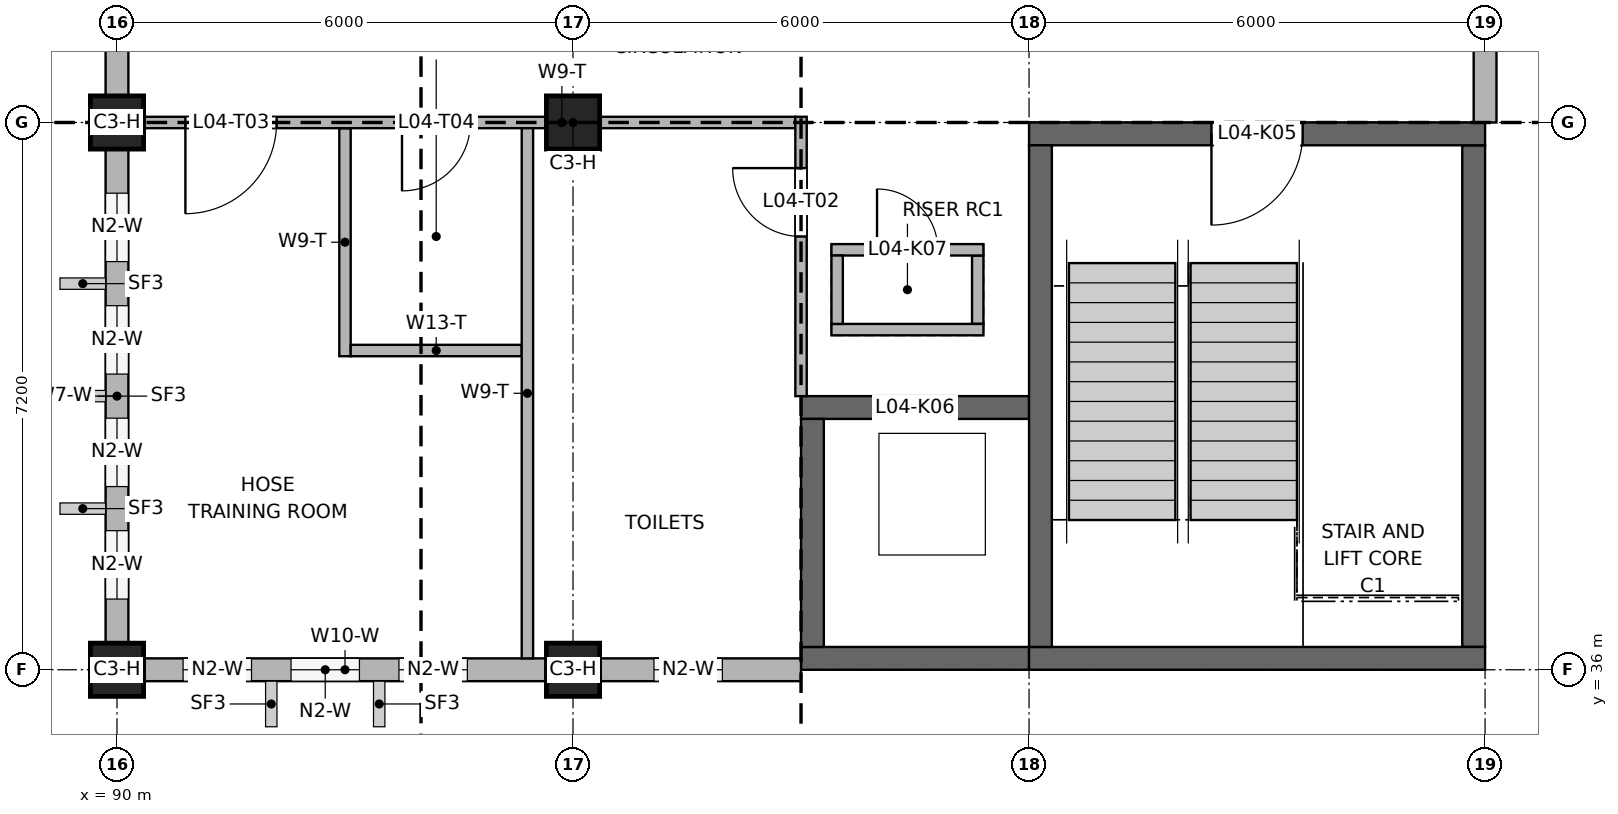
"""IFC4 building model, lengths in metres.
Left out: names, types, materials, properties, quantities, classifications, styles, units other than length and angle.
Written with IfcOpenShell. Run it as: python <this file> out.ifc"""

import sys

from ifc_helpers import new_model, si_unit, direction, frame, frame_2d, origin, origin_2d, place, context, subcontext, project, spatial, rectangle, extrude, element, fill, save


model = new_model("IFC4")
c1 = context("Model", 3, precision=1e-05, world=origin(), true_north=direction((0.0, 1.0)))
c2 = subcontext(c1, "Body", "Model", "MODEL_VIEW")
j1 = project(units=[si_unit("LENGTHUNIT", "METRE"), si_unit("PLANEANGLEUNIT", "RADIAN")], contexts=[c1])
p1 = place(None, origin())
s1 = spatial("IfcSite", under=j1, at=p1, CompositionType="ELEMENT")
p2 = place(p1, origin())
s2 = spatial("IfcBuilding", under=s1, at=p2, CompositionType="ELEMENT")
p3 = place(p2, frame((0.0, 0.0, 16.8)))
s3 = spatial("IfcBuildingStorey", under=s2, at=p3, CompositionType="ELEMENT", Elevation=16.8)
p4 = place(p3, frame((102.0, 36.15, 0.0), z_axis=(0.0, 0.0, 1.0), x_axis=(1.0, 0.0, 0.0)))
e1 = element("IfcWall", 1, at=p4, inside=s3, PredefinedType="SHEAR", context=c2, shape_type="SweptSolid", body=[
    extrude(rectangle(XDim=6.0, YDim=0.3, at=frame_2d((3.0, 0.0))), origin(), (0.0, 0.0, 1.0), 4.0),
])
p5 = place(p3, frame((102.0, 43.05, 0.0), z_axis=(0.0, 0.0, 1.0), x_axis=(1.0, 0.0, 0.0)))
e2 = element("IfcWall", 2, at=p5, inside=s3, PredefinedType="SHEAR", context=c2, shape_type="SweptSolid", body=[
    extrude(rectangle(XDim=6.0, YDim=0.3, at=frame_2d((3.0, 0.0))), origin(), (0.0, 0.0, 1.0), 4.0),
])
p6 = place(p5, frame((2.4, 0.0, 0.0)))
e3 = element("IfcOpeningElement", 3, at=p6, cuts=e2, PredefinedType="OPENING", context=c2, shape_type="SweptSolid", body=[
    extrude(rectangle(XDim=1.2, YDim=2.1, at=frame_2d((0.6, 1.05))), frame((0.0, 0.16, 0.0), z_axis=(0.0, -1.0, 0.0), x_axis=(1.0, 0.0, 0.0)), (0.0, 0.0, 1.0), 0.32),
])
for number, where, z_axis, x_axis in (
    (4, (102.15, 36.3, 0.0), (0.0, 0.0, 1.0), (0.0, 1.0, 0.0)),
    (5, (107.85, 36.3, 0.0), (0.0, 0.0, 1.0), (0.0, 1.0, 0.0)),
):
    element("IfcWall", number, at=place(p3, frame(where, z_axis=z_axis, x_axis=x_axis)), inside=s3, PredefinedType="SHEAR", context=c2, shape_type="SweptSolid", body=[
        extrude(rectangle(XDim=6.6, YDim=0.3, at=frame_2d((3.3, 0.0))), origin(), (0.0, 0.0, 1.0), 4.0),
    ])
p7 = place(p3, frame((99.0, 36.15, 0.0), z_axis=(0.0, 0.0, 1.0), x_axis=(1.0, 0.0, 0.0)))
e6 = element("IfcWall", 6, at=p7, inside=s3, PredefinedType="SHEAR", context=c2, shape_type="SweptSolid", body=[
    extrude(rectangle(XDim=3.0, YDim=0.3, at=frame_2d((1.5, 0.0))), origin(), (0.0, 0.0, 1.0), 4.2),
])
p8 = place(p3, frame((99.0, 39.45, 0.0), z_axis=(0.0, 0.0, 1.0), x_axis=(1.0, 0.0, 0.0)))
e7 = element("IfcWall", 7, at=p8, inside=s3, PredefinedType="SHEAR", context=c2, shape_type="SweptSolid", body=[
    extrude(rectangle(XDim=3.0, YDim=0.3, at=frame_2d((1.5, 0.0))), origin(), (0.0, 0.0, 1.0), 4.2),
])
p9 = place(p8, frame((0.95, 0.0, 0.0)))
e8 = element("IfcOpeningElement", 8, at=p9, cuts=e7, PredefinedType="OPENING", context=c2, shape_type="SweptSolid", body=[
    extrude(rectangle(XDim=1.1, YDim=2.1, at=frame_2d((0.55, 1.05))), frame((0.0, 0.16, 0.0), z_axis=(0.0, -1.0, 0.0), x_axis=(1.0, 0.0, 0.0)), (0.0, 0.0, 1.0), 0.32),
])
p10 = place(p3, frame((99.15, 36.3, 0.0), z_axis=(0.0, 0.0, 1.0), x_axis=(0.0, 1.0, 0.0)))
e9 = element("IfcWall", 9, at=p10, inside=s3, PredefinedType="SHEAR", context=c2, shape_type="SweptSolid", body=[
    extrude(rectangle(XDim=3.0, YDim=0.3, at=frame_2d((1.5, 0.0))), origin(), (0.0, 0.0, 1.0), 4.2),
])
p11 = place(p3, frame((99.4, 40.475, 0.0), z_axis=(0.0, 0.0, 1.0), x_axis=(1.0, 0.0, 0.0)))
e10 = element("IfcWall", 10, at=p11, inside=s3, PredefinedType="SOLIDWALL", context=c2, shape_type="SweptSolid", body=[
    extrude(rectangle(XDim=2.0, YDim=0.15, at=frame_2d((1.0, 0.0))), origin(), (0.0, 0.0, 1.0), 4.2),
])
p12 = place(p3, frame((99.4, 41.525, 0.0), z_axis=(0.0, 0.0, 1.0), x_axis=(1.0, 0.0, 0.0)))
e11 = element("IfcWall", 11, at=p12, inside=s3, PredefinedType="SOLIDWALL", context=c2, shape_type="SweptSolid", body=[
    extrude(rectangle(XDim=2.0, YDim=0.15, at=frame_2d((1.0, 0.0))), origin(), (0.0, 0.0, 1.0), 4.2),
])
p13 = place(p12, frame((0.6, 0.0, 0.0)))
e12 = element("IfcOpeningElement", 12, at=p13, cuts=e11, PredefinedType="OPENING", context=c2, shape_type="SweptSolid", body=[
    extrude(rectangle(XDim=0.8, YDim=2.1, at=frame_2d((0.4, 1.05))), frame((0.0, 0.085, 0.0), z_axis=(0.0, -1.0, 0.0), x_axis=(1.0, 0.0, 0.0)), (0.0, 0.0, 1.0), 0.17),
])
for number, where, z_axis, x_axis in (
    (13, (99.475, 40.55, 0.0), (0.0, 0.0, 1.0), (0.0, 1.0, 0.0)),
    (14, (101.325, 40.55, 0.0), (0.0, 0.0, 1.0), (0.0, 1.0, 0.0)),
):
    element("IfcWall", number, at=place(p3, frame(where, z_axis=z_axis, x_axis=x_axis)), inside=s3, PredefinedType="SOLIDWALL", context=c2, shape_type="SweptSolid", body=[
        extrude(rectangle(XDim=0.9, YDim=0.15, at=frame_2d((0.45, 0.0))), origin(), (0.0, 0.0, 1.0), 4.2),
    ])
for number, where, z_axis, x_axis in (
    (15, (90.0, 36.0, 0.0), (0.0, 0.0, 1.0), (1.0, 0.0, 0.0)),
    (16, (96.0, 36.0, 0.0), (0.0, 0.0, 1.0), (1.0, 0.0, 0.0)),
    (17, (90.0, 43.2, 0.0), (0.0, 0.0, 1.0), (1.0, 0.0, 0.0)),
    (18, (96.0, 43.2, 0.0), (0.0, 0.0, 1.0), (1.0, 0.0, 0.0)),
):
    element("IfcColumn", number, at=place(p3, frame(where, z_axis=z_axis, x_axis=x_axis)), inside=s3, PredefinedType="COLUMN", context=c2, shape_type="SweptSolid", body=[
        extrude(rectangle(XDim=0.7, YDim=0.7, at=origin_2d()), origin(), (0.0, 0.0, 1.0), 4.0),
    ])
p14 = place(p3, frame((90.0, 36.35, 0.0), z_axis=(0.0, 0.0, 1.0), x_axis=(0.0, 1.0, 0.0)))
e19 = element("IfcWall", 19, at=p14, inside=s3, PredefinedType="SOLIDWALL", context=c2, shape_type="SweptSolid", body=[
    extrude(rectangle(XDim=6.5, YDim=0.3, at=frame_2d((3.25, 0.0))), origin(), (0.0, 0.0, 1.0), 3.2),
])
p15 = place(p14, frame((0.58, 0.0, 0.9)))
e20 = element("IfcOpeningElement", 20, at=p15, cuts=e19, PredefinedType="OPENING", context=c2, shape_type="SweptSolid", body=[
    extrude(rectangle(XDim=0.9, YDim=1.2, at=frame_2d((0.45, 0.6))), frame((0.0, 0.16, 0.0), z_axis=(0.0, -1.0, 0.0), x_axis=(1.0, 0.0, 0.0)), (0.0, 0.0, 1.0), 0.32),
])
p16 = place(p14, frame((2.06, 0.0, 0.9)))
e21 = element("IfcOpeningElement", 21, at=p16, cuts=e19, PredefinedType="OPENING", context=c2, shape_type="SweptSolid", body=[
    extrude(rectangle(XDim=0.9, YDim=1.2, at=frame_2d((0.45, 0.6))), frame((0.0, 0.16, 0.0), z_axis=(0.0, -1.0, 0.0), x_axis=(1.0, 0.0, 0.0)), (0.0, 0.0, 1.0), 0.32),
])
p17 = place(p14, frame((3.54, 0.0, 0.9)))
e22 = element("IfcOpeningElement", 22, at=p17, cuts=e19, PredefinedType="OPENING", context=c2, shape_type="SweptSolid", body=[
    extrude(rectangle(XDim=0.9, YDim=1.2, at=frame_2d((0.45, 0.6))), frame((0.0, 0.16, 0.0), z_axis=(0.0, -1.0, 0.0), x_axis=(1.0, 0.0, 0.0)), (0.0, 0.0, 1.0), 0.32),
])
p18 = place(p14, frame((5.02, 0.0, 0.9)))
e23 = element("IfcOpeningElement", 23, at=p18, cuts=e19, PredefinedType="OPENING", context=c2, shape_type="SweptSolid", body=[
    extrude(rectangle(XDim=0.9, YDim=1.2, at=frame_2d((0.45, 0.6))), frame((0.0, 0.16, 0.0), z_axis=(0.0, -1.0, 0.0), x_axis=(1.0, 0.0, 0.0)), (0.0, 0.0, 1.0), 0.32),
])
p19 = place(p3, frame((90.0, 43.55, 0.0), z_axis=(0.0, 0.0, 1.0), x_axis=(0.0, 1.0, 0.0)))
e24 = element("IfcWall", 24, at=p19, inside=s3, PredefinedType="SOLIDWALL", context=c2, shape_type="SweptSolid", body=[
    extrude(rectangle(XDim=6.85, YDim=0.3, at=frame_2d((3.425, 0.0))), origin(), (0.0, 0.0, 1.0), 3.1),
])
p20 = place(p19, frame((2.275, 0.0, 0.9)))
e25 = element("IfcOpeningElement", 25, at=p20, cuts=e24, PredefinedType="OPENING", context=c2, shape_type="SweptSolid", body=[
    extrude(rectangle(XDim=0.9, YDim=1.2, at=frame_2d((0.45, 0.6))), frame((0.0, 0.16, 0.0), z_axis=(0.0, -1.0, 0.0), x_axis=(1.0, 0.0, 0.0)), (0.0, 0.0, 1.0), 0.32),
])
p21 = place(p19, frame((3.8, 0.0, 0.9)))
e26 = element("IfcOpeningElement", 26, at=p21, cuts=e24, PredefinedType="OPENING", context=c2, shape_type="SweptSolid", body=[
    extrude(rectangle(XDim=0.9, YDim=1.2, at=frame_2d((0.45, 0.6))), frame((0.0, 0.16, 0.0), z_axis=(0.0, -1.0, 0.0), x_axis=(1.0, 0.0, 0.0)), (0.0, 0.0, 1.0), 0.32),
])
p22 = place(p19, frame((5.325, 0.0, 0.9)))
e27 = element("IfcOpeningElement", 27, at=p22, cuts=e24, PredefinedType="OPENING", context=c2, shape_type="SweptSolid", body=[
    extrude(rectangle(XDim=0.9, YDim=1.2, at=frame_2d((0.45, 0.6))), frame((0.0, 0.16, 0.0), z_axis=(0.0, -1.0, 0.0), x_axis=(1.0, 0.0, 0.0)), (0.0, 0.0, 1.0), 0.32),
])
p23 = place(p3, frame((108.0, 43.2, 0.0), z_axis=(0.0, 0.0, 1.0), x_axis=(0.0, 1.0, 0.0)))
e28 = element("IfcWall", 28, at=p23, inside=s3, PredefinedType="SOLIDWALL", context=c2, shape_type="SweptSolid", body=[
    extrude(rectangle(XDim=6.85, YDim=0.3, at=frame_2d((3.425, 0.0))), origin(), (0.0, 0.0, 1.0), 3.1),
])
p24 = place(p23, frame((2.597, 0.0, 0.9)))
e29 = element("IfcOpeningElement", 29, at=p24, cuts=e28, PredefinedType="OPENING", context=c2, shape_type="SweptSolid", body=[
    extrude(rectangle(XDim=0.9, YDim=1.2, at=frame_2d((0.45, 0.6))), frame((0.0, 0.16, 0.0), z_axis=(0.0, -1.0, 0.0), x_axis=(1.0, 0.0, 0.0)), (0.0, 0.0, 1.0), 0.32),
])
p25 = place(p23, frame((4.015, 0.0, 0.9)))
e30 = element("IfcOpeningElement", 30, at=p25, cuts=e28, PredefinedType="OPENING", context=c2, shape_type="SweptSolid", body=[
    extrude(rectangle(XDim=0.9, YDim=1.2, at=frame_2d((0.45, 0.6))), frame((0.0, 0.16, 0.0), z_axis=(0.0, -1.0, 0.0), x_axis=(1.0, 0.0, 0.0)), (0.0, 0.0, 1.0), 0.32),
])
p26 = place(p23, frame((5.433, 0.0, 0.9)))
e31 = element("IfcOpeningElement", 31, at=p26, cuts=e28, PredefinedType="OPENING", context=c2, shape_type="SweptSolid", body=[
    extrude(rectangle(XDim=0.9, YDim=1.2, at=frame_2d((0.45, 0.6))), frame((0.0, 0.16, 0.0), z_axis=(0.0, -1.0, 0.0), x_axis=(1.0, 0.0, 0.0)), (0.0, 0.0, 1.0), 0.32),
])
p27 = place(p3, frame((90.35, 36.0, 0.0), z_axis=(0.0, 0.0, 1.0), x_axis=(1.0, 0.0, 0.0)))
e32 = element("IfcWall", 32, at=p27, inside=s3, PredefinedType="SOLIDWALL", context=c2, shape_type="SweptSolid", body=[
    extrude(rectangle(XDim=5.3, YDim=0.3, at=frame_2d((2.65, 0.0))), origin(), (0.0, 0.0, 1.0), 3.3),
])
p28 = place(p27, frame((0.52, 0.0, 0.9)))
e33 = element("IfcOpeningElement", 33, at=p28, cuts=e32, PredefinedType="OPENING", context=c2, shape_type="SweptSolid", body=[
    extrude(rectangle(XDim=0.9, YDim=1.2, at=frame_2d((0.45, 0.6))), frame((0.0, 0.16, 0.0), z_axis=(0.0, -1.0, 0.0), x_axis=(1.0, 0.0, 0.0)), (0.0, 0.0, 1.0), 0.32),
])
p29 = place(p27, frame((1.94, 0.0, 0.9)))
e34 = element("IfcOpeningElement", 34, at=p29, cuts=e32, PredefinedType="OPENING", context=c2, shape_type="SweptSolid", body=[
    extrude(rectangle(XDim=0.9, YDim=1.2, at=frame_2d((0.45, 0.6))), frame((0.0, 0.16, 0.0), z_axis=(0.0, -1.0, 0.0), x_axis=(1.0, 0.0, 0.0)), (0.0, 0.0, 1.0), 0.32),
])
p30 = place(p27, frame((3.36, 0.0, 0.9)))
e35 = element("IfcOpeningElement", 35, at=p30, cuts=e32, PredefinedType="OPENING", context=c2, shape_type="SweptSolid", body=[
    extrude(rectangle(XDim=0.9, YDim=1.2, at=frame_2d((0.45, 0.6))), frame((0.0, 0.16, 0.0), z_axis=(0.0, -1.0, 0.0), x_axis=(1.0, 0.0, 0.0)), (0.0, 0.0, 1.0), 0.32),
])
p31 = place(p3, frame((96.35, 36.0, 0.0), z_axis=(0.0, 0.0, 1.0), x_axis=(1.0, 0.0, 0.0)))
e36 = element("IfcWall", 36, at=p31, inside=s3, PredefinedType="SOLIDWALL", context=c2, shape_type="SweptSolid", body=[
    extrude(rectangle(XDim=2.65, YDim=0.3, at=frame_2d((1.325, 0.0))), origin(), (0.0, 0.0, 1.0), 3.3),
])
p32 = place(p31, frame((0.715, 0.0, 0.9)))
e37 = element("IfcOpeningElement", 37, at=p32, cuts=e36, PredefinedType="OPENING", context=c2, shape_type="SweptSolid", body=[
    extrude(rectangle(XDim=0.9, YDim=1.2, at=frame_2d((0.45, 0.6))), frame((0.0, 0.16, 0.0), z_axis=(0.0, -1.0, 0.0), x_axis=(1.0, 0.0, 0.0)), (0.0, 0.0, 1.0), 0.32),
])
p33 = place(p3, frame((93.0, 40.125, 0.0), z_axis=(0.0, 0.0, 1.0), x_axis=(0.0, 1.0, 0.0)))
e38 = element("IfcWall", 38, at=p33, inside=s3, PredefinedType="PARTITIONING", context=c2, shape_type="SweptSolid", body=[
    extrude(rectangle(XDim=3.0, YDim=0.15, at=frame_2d((1.5, 0.0))), origin(), (0.0, 0.0, 1.0), 3.3),
])
p34 = place(p3, frame((95.4, 36.15, 0.0), z_axis=(0.0, 0.0, 1.0), x_axis=(0.0, 1.0, 0.0)))
e39 = element("IfcWall", 39, at=p34, inside=s3, PredefinedType="PARTITIONING", context=c2, shape_type="SweptSolid", body=[
    extrude(rectangle(XDim=6.975, YDim=0.15, at=frame_2d((3.488, 0.0))), origin(), (0.0, 0.0, 1.0), 3.3),
])
p35 = place(p3, frame((99.0, 39.6, 0.0), z_axis=(0.0, 0.0, 1.0), x_axis=(0.0, 1.0, 0.0)))
e40 = element("IfcWall", 40, at=p35, inside=s3, PredefinedType="PARTITIONING", context=c2, shape_type="SweptSolid", body=[
    extrude(rectangle(XDim=3.675, YDim=0.15, at=frame_2d((1.837, 0.0))), origin(), (0.0, 0.0, 1.0), 4.0),
])
p36 = place(p35, frame((2.1, 0.0, 0.0)))
e41 = element("IfcOpeningElement", 41, at=p36, cuts=e40, PredefinedType="OPENING", context=c2, shape_type="SweptSolid", body=[
    extrude(rectangle(XDim=0.9, YDim=2.1, at=frame_2d((0.45, 1.05))), frame((0.0, 0.085, 0.0), z_axis=(0.0, -1.0, 0.0), x_axis=(1.0, 0.0, 0.0)), (0.0, 0.0, 1.0), 0.17),
])
p37 = place(p3, frame((93.075, 40.2, 0.0), z_axis=(0.0, 0.0, 1.0), x_axis=(1.0, 0.0, 0.0)))
e42 = element("IfcWall", 42, at=p37, inside=s3, PredefinedType="PARTITIONING", context=c2, shape_type="SweptSolid", body=[
    extrude(rectangle(XDim=2.25, YDim=0.15, at=frame_2d((1.125, 0.0))), origin(), (0.0, 0.0, 1.0), 4.0),
])
p38 = place(p3, frame((90.15, 43.2, 0.0), z_axis=(0.0, 0.0, 1.0), x_axis=(1.0, 0.0, 0.0)))
e43 = element("IfcWall", 43, at=p38, inside=s3, PredefinedType="PARTITIONING", context=c2, shape_type="SweptSolid", body=[
    extrude(rectangle(XDim=8.775, YDim=0.15, at=frame_2d((4.388, 0.0))), origin(), (0.0, 0.0, 1.0), 3.3),
])
p39 = place(p38, frame((0.75, 0.0, 0.0)))
e44 = element("IfcOpeningElement", 44, at=p39, cuts=e43, PredefinedType="OPENING", context=c2, shape_type="SweptSolid", body=[
    extrude(rectangle(XDim=1.2, YDim=2.1, at=frame_2d((0.6, 1.05))), frame((0.0, 0.085, 0.0), z_axis=(0.0, -1.0, 0.0), x_axis=(1.0, 0.0, 0.0)), (0.0, 0.0, 1.0), 0.17),
])
p40 = place(p38, frame((3.6, 0.0, 0.0)))
e45 = element("IfcOpeningElement", 45, at=p40, cuts=e43, PredefinedType="OPENING", context=c2, shape_type="SweptSolid", body=[
    extrude(rectangle(XDim=0.9, YDim=2.1, at=frame_2d((0.45, 1.05))), frame((0.0, 0.085, 0.0), z_axis=(0.0, -1.0, 0.0), x_axis=(1.0, 0.0, 0.0)), (0.0, 0.0, 1.0), 0.17),
])
p41 = place(p15, origin())
e46 = element("IfcWindow", 46, at=p41, inside=s3, PartitioningType="SINGLE_PANEL", PredefinedType="WINDOW", context=c2, shape_type="SweptSolid", body=[
    extrude(rectangle(XDim=0.9, YDim=1.2, at=frame_2d((0.45, 0.6))), frame((0.0, 0.03, 0.0), z_axis=(0.0, -1.0, 0.0), x_axis=(1.0, 0.0, 0.0)), (0.0, 0.0, 1.0), 0.06),
])
fill(e20, e46)
p42 = place(p16, origin())
e47 = element("IfcWindow", 47, at=p42, inside=s3, PartitioningType="SINGLE_PANEL", PredefinedType="WINDOW", context=c2, shape_type="SweptSolid", body=[
    extrude(rectangle(XDim=0.9, YDim=1.2, at=frame_2d((0.45, 0.6))), frame((0.0, 0.03, 0.0), z_axis=(0.0, -1.0, 0.0), x_axis=(1.0, 0.0, 0.0)), (0.0, 0.0, 1.0), 0.06),
])
fill(e21, e47)
p43 = place(p17, origin())
e48 = element("IfcWindow", 48, at=p43, inside=s3, PartitioningType="SINGLE_PANEL", PredefinedType="WINDOW", context=c2, shape_type="SweptSolid", body=[
    extrude(rectangle(XDim=0.9, YDim=1.2, at=frame_2d((0.45, 0.6))), frame((0.0, 0.03, 0.0), z_axis=(0.0, -1.0, 0.0), x_axis=(1.0, 0.0, 0.0)), (0.0, 0.0, 1.0), 0.06),
])
fill(e22, e48)
p44 = place(p18, origin())
e49 = element("IfcWindow", 49, at=p44, inside=s3, PartitioningType="SINGLE_PANEL", PredefinedType="WINDOW", context=c2, shape_type="SweptSolid", body=[
    extrude(rectangle(XDim=0.9, YDim=1.2, at=frame_2d((0.45, 0.6))), frame((0.0, 0.03, 0.0), z_axis=(0.0, -1.0, 0.0), x_axis=(1.0, 0.0, 0.0)), (0.0, 0.0, 1.0), 0.06),
])
fill(e23, e49)
p45 = place(p28, origin())
e50 = element("IfcWindow", 50, at=p45, inside=s3, PartitioningType="SINGLE_PANEL", PredefinedType="WINDOW", context=c2, shape_type="SweptSolid", body=[
    extrude(rectangle(XDim=0.9, YDim=1.2, at=frame_2d((0.45, 0.6))), frame((0.0, 0.03, 0.0), z_axis=(0.0, -1.0, 0.0), x_axis=(1.0, 0.0, 0.0)), (0.0, 0.0, 1.0), 0.06),
])
fill(e33, e50)
p46 = place(p29, origin())
e51 = element("IfcWindow", 51, at=p46, inside=s3, PartitioningType="SINGLE_PANEL", PredefinedType="WINDOW", context=c2, shape_type="SweptSolid", body=[
    extrude(rectangle(XDim=0.9, YDim=1.2, at=frame_2d((0.45, 0.6))), frame((0.0, 0.03, 0.0), z_axis=(0.0, -1.0, 0.0), x_axis=(1.0, 0.0, 0.0)), (0.0, 0.0, 1.0), 0.06),
])
fill(e34, e51)
p47 = place(p30, origin())
e52 = element("IfcWindow", 52, at=p47, inside=s3, PartitioningType="SINGLE_PANEL", PredefinedType="WINDOW", context=c2, shape_type="SweptSolid", body=[
    extrude(rectangle(XDim=0.9, YDim=1.2, at=frame_2d((0.45, 0.6))), frame((0.0, 0.03, 0.0), z_axis=(0.0, -1.0, 0.0), x_axis=(1.0, 0.0, 0.0)), (0.0, 0.0, 1.0), 0.06),
])
fill(e35, e52)
p48 = place(p32, origin())
e53 = element("IfcWindow", 53, at=p48, inside=s3, PartitioningType="SINGLE_PANEL", PredefinedType="WINDOW", context=c2, shape_type="SweptSolid", body=[
    extrude(rectangle(XDim=0.9, YDim=1.2, at=frame_2d((0.45, 0.6))), frame((0.0, 0.03, 0.0), z_axis=(0.0, -1.0, 0.0), x_axis=(1.0, 0.0, 0.0)), (0.0, 0.0, 1.0), 0.06),
])
fill(e37, e53)
p49 = place(p6, frame((1.2, 0.0, 0.0), z_axis=(0.0, 0.0, 1.0), x_axis=(-1.0, 0.0, 0.0)))
e54 = element("IfcDoor", 54, at=p49, inside=s3, OperationType="SINGLE_SWING_RIGHT", PredefinedType="DOOR", context=c2, shape_type="SweptSolid", body=[
    extrude(rectangle(XDim=1.2, YDim=2.1, at=frame_2d((0.6, 1.05))), frame((0.0, 0.025, 0.0), z_axis=(0.0, -1.0, 0.0), x_axis=(1.0, 0.0, 0.0)), (0.0, 0.0, 1.0), 0.05),
])
fill(e3, e54)
p50 = place(p9, origin())
e55 = element("IfcDoor", 55, at=p50, inside=s3, OperationType="DOUBLE_DOOR_SLIDING", PredefinedType="DOOR", context=c2, shape_type="SweptSolid", body=[
    extrude(rectangle(XDim=1.1, YDim=2.1, at=frame_2d((0.55, 1.05))), frame((0.0, 0.025, 0.0), z_axis=(0.0, -1.0, 0.0), x_axis=(1.0, 0.0, 0.0)), (0.0, 0.0, 1.0), 0.05),
])
fill(e8, e55)
p51 = place(p13, origin())
e56 = element("IfcDoor", 56, at=p51, inside=s3, OperationType="SINGLE_SWING_LEFT", PredefinedType="DOOR", context=c2, shape_type="SweptSolid", body=[
    extrude(rectangle(XDim=0.8, YDim=2.1, at=frame_2d((0.4, 1.05))), frame((0.0, 0.025, 0.0), z_axis=(0.0, -1.0, 0.0), x_axis=(1.0, 0.0, 0.0)), (0.0, 0.0, 1.0), 0.05),
])
fill(e12, e56)
p52 = place(p36, origin())
e57 = element("IfcDoor", 57, at=p52, inside=s3, OperationType="SINGLE_SWING_RIGHT", PredefinedType="DOOR", context=c2, shape_type="SweptSolid", body=[
    extrude(rectangle(XDim=0.9, YDim=2.1, at=frame_2d((0.45, 1.05))), frame((0.0, 0.025, 0.0), z_axis=(0.0, -1.0, 0.0), x_axis=(1.0, 0.0, 0.0)), (0.0, 0.0, 1.0), 0.05),
])
fill(e41, e57)
p53 = place(p39, frame((1.2, 0.0, 0.0), z_axis=(0.0, 0.0, 1.0), x_axis=(-1.0, 0.0, 0.0)))
e58 = element("IfcDoor", 58, at=p53, inside=s3, OperationType="SINGLE_SWING_RIGHT", PredefinedType="DOOR", context=c2, shape_type="SweptSolid", body=[
    extrude(rectangle(XDim=1.2, YDim=2.1, at=frame_2d((0.6, 1.05))), frame((0.0, 0.025, 0.0), z_axis=(0.0, -1.0, 0.0), x_axis=(1.0, 0.0, 0.0)), (0.0, 0.0, 1.0), 0.05),
])
fill(e44, e58)
p54 = place(p40, frame((0.9, 0.0, 0.0), z_axis=(0.0, 0.0, 1.0), x_axis=(-1.0, 0.0, 0.0)))
e59 = element("IfcDoor", 59, at=p54, inside=s3, OperationType="SINGLE_SWING_RIGHT", PredefinedType="DOOR", context=c2, shape_type="SweptSolid", body=[
    extrude(rectangle(XDim=0.9, YDim=2.1, at=frame_2d((0.45, 1.05))), frame((0.0, 0.025, 0.0), z_axis=(0.0, -1.0, 0.0), x_axis=(1.0, 0.0, 0.0)), (0.0, 0.0, 1.0), 0.05),
])
fill(e45, e59)
save(model, sys.argv[1])
